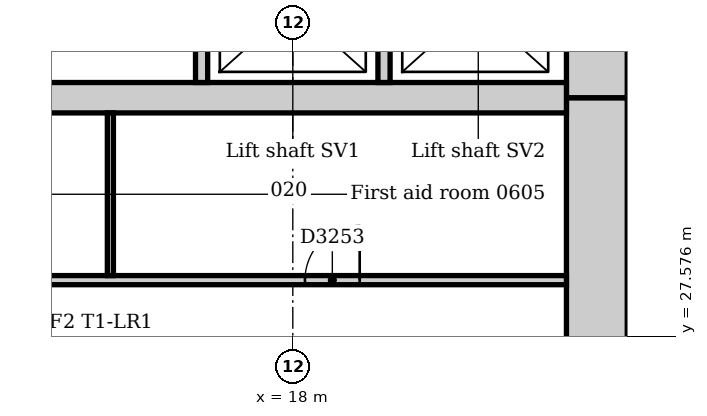
"""IFC4 building model, lengths in metres.
Left out: names, types, materials, properties, quantities, classifications, styles, units other than length and angle.
Written with IfcOpenShell. Run it as: python <this file> out.ifc"""

import sys

from ifc_helpers import new_model, si_unit, direction, frame, frame_2d, origin, place, context, subcontext, project, spatial, rectangle, extrude, element, fill, save


model = new_model("IFC4")
c1 = context("Model", 3, precision=1e-05, world=origin(), true_north=direction((0.0, 1.0)))
c2 = subcontext(c1, "Body", "Model", "MODEL_VIEW")
j1 = project(units=[si_unit("LENGTHUNIT", "METRE"), si_unit("PLANEANGLEUNIT", "RADIAN")], contexts=[c1])
p1 = place(None, origin())
s1 = spatial("IfcSite", under=j1, at=p1, CompositionType="ELEMENT")
p2 = place(p1, origin())
s2 = spatial("IfcBuilding", under=s1, at=p2, CompositionType="ELEMENT")
p3 = place(p2, frame((0.0, 0.0, 30.0)))
s3 = spatial("IfcBuildingStorey", under=s2, at=p3, CompositionType="ELEMENT", Elevation=30.0)
p4 = place(p3, frame((23.0, 21.0, 0.0), z_axis=(0.0, 0.0, 1.0), x_axis=(0.0, 1.0, 0.0)))
e1 = element("IfcWall", 1, at=p4, inside=s3, PredefinedType="SOLIDWALL", context=c2, shape_type="SweptSolid", body=[
    extrude(rectangle(XDim=10.5, YDim=1.0, at=frame_2d((5.25, 0.0))), origin(), (0.0, 0.0, 1.0), 4.0),
])
p5 = place(p4, frame((4.35, 0.0, 0.0)))
e2 = element("IfcOpeningElement", 2, at=p5, cuts=e1, PredefinedType="OPENING", context=c2, shape_type="SweptSolid", body=[
    extrude(rectangle(XDim=1.8, YDim=2.1, at=frame_2d((0.9, 1.05))), frame((0.0, 0.51, 0.0), z_axis=(0.0, -1.0, 0.0), x_axis=(1.0, 0.0, 0.0)), (0.0, 0.0, 1.0), 1.02),
])
p6 = place(p3, frame((23.0, 31.5, 0.0), z_axis=(0.0, 0.0, 1.0), x_axis=(0.0, 1.0, 0.0)))
e3 = element("IfcWall", 3, at=p6, inside=s3, PredefinedType="SOLIDWALL", context=c2, shape_type="SweptSolid", body=[
    extrude(rectangle(XDim=10.5, YDim=1.0, at=frame_2d((5.25, 0.0))), origin(), (0.0, 0.0, 1.0), 4.0),
])
p7 = place(p6, frame((3.15, 0.0, 0.0)))
e4 = element("IfcOpeningElement", 4, at=p7, cuts=e3, PredefinedType="OPENING", context=c2, shape_type="SweptSolid", body=[
    extrude(rectangle(XDim=1.0, YDim=2.1, at=frame_2d((0.5, 1.05))), frame((0.0, 0.51, 0.0), z_axis=(0.0, -1.0, 0.0), x_axis=(1.0, 0.0, 0.0)), (0.0, 0.0, 1.0), 1.02),
])
p8 = place(p6, frame((5.2, 0.0, 0.0)))
e5 = element("IfcOpeningElement", 5, at=p8, cuts=e3, PredefinedType="OPENING", context=c2, shape_type="SweptSolid", body=[
    extrude(rectangle(XDim=1.0, YDim=2.1, at=frame_2d((0.5, 1.05))), frame((0.0, 0.51, 0.0), z_axis=(0.0, -1.0, 0.0), x_axis=(1.0, 0.0, 0.0)), (0.0, 0.0, 1.0), 1.02),
])
p9 = place(p3, frame((4.5, 31.5, 0.0), z_axis=(0.0, 0.0, 1.0), x_axis=(1.0, 0.0, 0.0)))
e6 = element("IfcWall", 6, at=p9, inside=s3, PredefinedType="SOLIDWALL", context=c2, shape_type="SweptSolid", body=[
    extrude(rectangle(XDim=18.0, YDim=0.5, at=frame_2d((9.0, 0.0))), origin(), (0.0, 0.0, 1.0), 4.0),
])
for number, where, z_axis, x_axis in (
    (7, (16.5, 31.75, 0.0), (0.0, 0.0, 1.0), (0.0, 1.0, 0.0)),
    (8, (19.5, 31.75, 0.0), (0.0, 0.0, 1.0), (0.0, 1.0, 0.0)),
):
    element("IfcWall", number, at=place(p3, frame(where, z_axis=z_axis, x_axis=x_axis)), inside=s3, PredefinedType="PARTITIONING", context=c2, shape_type="SweptSolid", body=[
        extrude(rectangle(XDim=2.65, YDim=0.2, at=frame_2d((1.325, 0.0))), origin(), (0.0, 0.0, 1.0), 3.85),
    ])
p10 = place(p3, frame((4.5, 28.5, 0.0), z_axis=(0.0, 0.0, 1.0), x_axis=(1.0, 0.0, 0.0)))
e9 = element("IfcWall", 9, at=p10, inside=s3, PredefinedType="PARTITIONING", context=c2, shape_type="SweptSolid", body=[
    extrude(rectangle(XDim=18.0, YDim=0.15, at=frame_2d((9.0, 0.0))), origin(), (0.0, 0.0, 1.0), 3.85),
])
p11 = place(p10, frame((3.35, 0.0, 0.0)))
e10 = element("IfcOpeningElement", 10, at=p11, cuts=e9, PredefinedType="OPENING", context=c2, shape_type="SweptSolid", body=[
    extrude(rectangle(XDim=0.9, YDim=2.1, at=frame_2d((0.45, 1.05))), frame((0.0, 0.085, 0.0), z_axis=(0.0, -1.0, 0.0), x_axis=(1.0, 0.0, 0.0)), (0.0, 0.0, 1.0), 0.17),
])
p12 = place(p10, frame((8.55, 0.0, 0.0)))
e11 = element("IfcOpeningElement", 11, at=p12, cuts=e9, PredefinedType="OPENING", context=c2, shape_type="SweptSolid", body=[
    extrude(rectangle(XDim=0.9, YDim=2.1, at=frame_2d((0.45, 1.05))), frame((0.0, 0.085, 0.0), z_axis=(0.0, -1.0, 0.0), x_axis=(1.0, 0.0, 0.0)), (0.0, 0.0, 1.0), 0.17),
])
p13 = place(p10, frame((13.7, 0.0, 0.0)))
e12 = element("IfcOpeningElement", 12, at=p13, cuts=e9, PredefinedType="OPENING", context=c2, shape_type="SweptSolid", body=[
    extrude(rectangle(XDim=0.9, YDim=2.1, at=frame_2d((0.45, 1.05))), frame((0.0, 0.085, 0.0), z_axis=(0.0, -1.0, 0.0), x_axis=(1.0, 0.0, 0.0)), (0.0, 0.0, 1.0), 0.17),
])
p14 = place(p3, frame((15.0, 28.575, 0.0), z_axis=(0.0, 0.0, 1.0), x_axis=(0.0, 1.0, 0.0)))
e13 = element("IfcWall", 13, at=p14, inside=s3, PredefinedType="PARTITIONING", context=c2, shape_type="SweptSolid", body=[
    extrude(rectangle(XDim=2.675, YDim=0.1, at=frame_2d((1.337, 0.0))), origin(), (0.0, 0.0, 1.0), 3.85),
])
p15 = place(p13, origin())
e14 = element("IfcDoor", 14, at=p15, inside=s3, OperationType="SINGLE_SWING_RIGHT", PredefinedType="DOOR", context=c2, shape_type="SweptSolid", body=[
    extrude(rectangle(XDim=0.9, YDim=2.1, at=frame_2d((0.45, 1.05))), frame((0.0, 0.025, 0.0), z_axis=(0.0, -1.0, 0.0), x_axis=(1.0, 0.0, 0.0)), (0.0, 0.0, 1.0), 0.05),
])
fill(e12, e14)
save(model, sys.argv[1])
